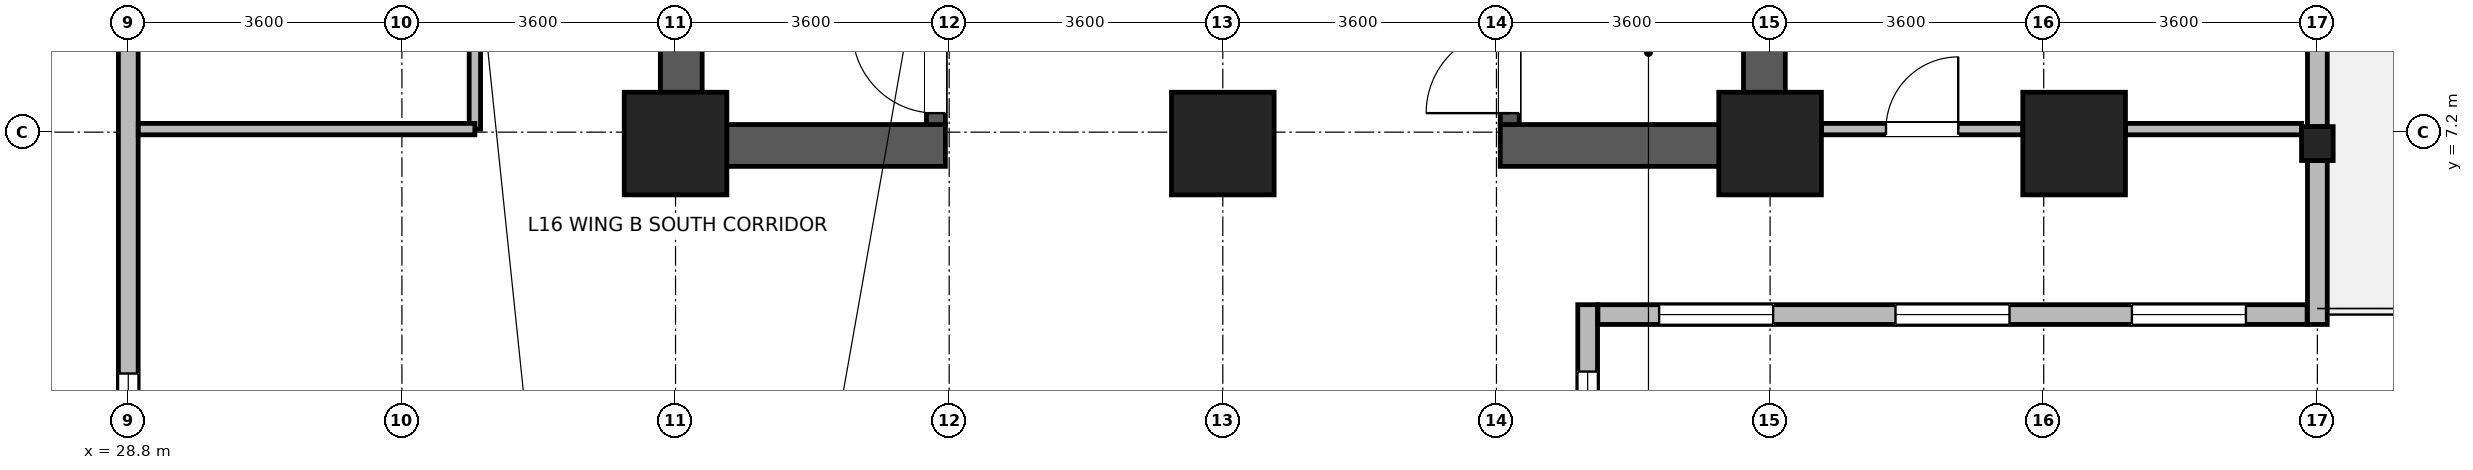
"""IFC4 building model, lengths in metres.
Left out: names, types, materials, properties, quantities, classifications, styles, units other than length and angle.
Written with IfcOpenShell. Run it as: python <this file> out.ifc"""

import sys

from ifc_helpers import new_model, si_unit, direction, frame, frame_2d, origin, origin_2d, place, context, subcontext, project, spatial, rectangle, i_section, extrude, source, transform, mapped, element, fill, save


model = new_model("IFC4")
c1 = context("Model", 3, precision=1e-05, world=origin(), true_north=direction((0.0, 1.0)))
c2 = subcontext(c1, "Body", "Model", "MODEL_VIEW")
j1 = project(units=[si_unit("LENGTHUNIT", "METRE"), si_unit("PLANEANGLEUNIT", "RADIAN")], contexts=[c1])
p1 = place(None, origin())
s1 = spatial("IfcSite", under=j1, at=p1, CompositionType="ELEMENT")
p2 = place(p1, origin())
s2 = spatial("IfcBuilding", under=s1, at=p2, CompositionType="ELEMENT")
p3 = place(p2, frame((0.0, 0.0, 66.0)))
s3 = spatial("IfcBuildingStorey", under=s2, at=p3, CompositionType="ELEMENT", Elevation=66.0)
for number, where, z_axis, x_axis in (
    (1, (36.075, 6.75, 0.0), (0.0, 0.0, 1.0), (0.0, 1.0, 0.0)),
    (2, (50.325, 6.75, 0.0), (0.0, 0.0, 1.0), (0.0, 1.0, 0.0)),
):
    element("IfcWall", number, at=place(p3, frame(where, z_axis=z_axis, x_axis=x_axis)), inside=s3, PredefinedType="SHEAR", context=c2, shape_type="SweptSolid", body=[
        extrude(rectangle(XDim=8.1, YDim=0.55, at=frame_2d((4.05, 0.0))), origin(), (0.0, 0.0, 1.0), 3.45),
    ])
for number, where, z_axis, x_axis in (
    (3, (36.35, 7.025, 0.0), (0.0, 0.0, 1.0), (1.0, 0.0, 0.0)),
    (4, (46.85, 7.025, 0.0), (0.0, 0.0, 1.0), (1.0, 0.0, 0.0)),
):
    element("IfcWall", number, at=place(p3, frame(where, z_axis=z_axis, x_axis=x_axis)), inside=s3, PredefinedType="SHEAR", context=c2, shape_type="SweptSolid", body=[
        extrude(rectangle(XDim=3.2, YDim=0.55, at=frame_2d((1.6, 0.0))), origin(), (0.0, 0.0, 1.0), 3.45),
    ])
p4 = place(p3, frame((39.425, 7.3, 0.0), z_axis=(0.0, 0.0, 1.0), x_axis=(0.0, 1.0, 0.0)))
e5 = element("IfcWall", 5, at=p4, inside=s3, PredefinedType="SHEAR", context=c2, shape_type="SweptSolid", body=[
    extrude(rectangle(XDim=7.0, YDim=0.25, at=frame_2d((3.5, 0.0))), origin(), (0.0, 0.0, 1.0), 3.45),
])
p5 = place(p4, frame((0.15, 0.0, 0.0)))
e6 = element("IfcOpeningElement", 6, at=p5, cuts=e5, PredefinedType="OPENING", context=c2, shape_type="SweptSolid", body=[
    extrude(rectangle(XDim=1.1, YDim=2.08, at=frame_2d((0.55, 1.04))), frame((0.0, 0.135, 0.0), z_axis=(0.0, -1.0, 0.0), x_axis=(1.0, 0.0, 0.0)), (0.0, 0.0, 1.0), 0.27),
])
p6 = place(p3, frame((46.975, 7.3, 0.0), z_axis=(0.0, 0.0, 1.0), x_axis=(0.0, 1.0, 0.0)))
e7 = element("IfcWall", 7, at=p6, inside=s3, PredefinedType="SHEAR", context=c2, shape_type="SweptSolid", body=[
    extrude(rectangle(XDim=7.0, YDim=0.25, at=frame_2d((3.5, 0.0))), origin(), (0.0, 0.0, 1.0), 3.45),
])
p7 = place(p6, frame((0.15, 0.0, 0.0)))
e8 = element("IfcOpeningElement", 8, at=p7, cuts=e7, PredefinedType="OPENING", context=c2, shape_type="SweptSolid", body=[
    extrude(rectangle(XDim=1.1, YDim=2.08, at=frame_2d((0.55, 1.04))), frame((0.0, 0.135, 0.0), z_axis=(0.0, -1.0, 0.0), x_axis=(1.0, 0.0, 0.0)), (0.0, 0.0, 1.0), 0.27),
])
m1 = source(origin(), c2, "Body", "SweptSolid", [
    extrude(rectangle(XDim=1.35, YDim=1.35, at=origin_2d()), origin(), (0.0, 0.0, 1.0), 3.7),
])
for number, where, z_axis, x_axis in (
    (9, (36.0, 7.05, 0.0), (0.0, 0.0, 1.0), (1.0, 0.0, 0.0)),
    (10, (43.2, 7.05, 0.0), (0.0, 0.0, 1.0), (1.0, 0.0, 0.0)),
    (11, (50.4, 7.05, 0.0), (0.0, 0.0, 1.0), (1.0, 0.0, 0.0)),
    (12, (54.4, 7.05, 0.0), (0.0, 0.0, 1.0), (1.0, 0.0, 0.0)),
):
    element("IfcColumn", number, at=place(p3, frame(where, z_axis=z_axis, x_axis=x_axis)), inside=s3, PredefinedType="COLUMN", context=c2, shape_type="MappedRepresentation", body=[
        mapped(m1, transform((0.0, 0.0, 0.0), x_axis=(1.0, 0.0, 0.0), y_axis=(0.0, 1.0, 0.0), z_axis=(0.0, 0.0, 1.0), scale=1.0)),
    ])
m2 = source(origin(), c2, "Body", "SweptSolid", [
    extrude(i_section(OverallWidth=0.416, OverallDepth=0.446, WebThickness=0.029, FlangeThickness=0.04, FilletRadius=0.015, at=origin_2d()), origin(), (0.0, 0.0, 1.0), 3.7),
])
p8 = place(p3, frame((57.6, 7.05, 0.0), z_axis=(0.0, 0.0, 1.0), x_axis=(1.0, 0.0, 0.0)))
e13 = element("IfcColumn", 13, at=p8, inside=s3, PredefinedType="COLUMN", context=c2, shape_type="MappedRepresentation", body=[
    mapped(m2, transform((0.0, 0.0, 0.0), x_axis=(1.0, 0.0, 0.0), y_axis=(0.0, 1.0, 0.0), z_axis=(0.0, 0.0, 1.0), scale=1.0)),
])
p9 = place(p3, frame((48.0, 4.93, 0.0), z_axis=(0.0, 0.0, 1.0), x_axis=(0.0, -1.0, 0.0)))
e14 = element("IfcWall", 14, at=p9, inside=s3, PredefinedType="STANDARD", context=c2, shape_type="SweptSolid", body=[
    extrude(rectangle(XDim=3.26, YDim=0.26, at=frame_2d((1.63, 0.0))), origin(), (0.0, 0.0, 1.0), 3.43),
])
p10 = place(p9, frame((0.88, 0.0, 0.85)))
e15 = element("IfcOpeningElement", 15, at=p10, cuts=e14, PredefinedType="OPENING", context=c2, shape_type="SweptSolid", body=[
    extrude(rectangle(XDim=1.5, YDim=1.85, at=frame_2d((0.75, 0.925))), frame((0.0, 0.14, 0.0), z_axis=(0.0, -1.0, 0.0), x_axis=(1.0, 0.0, 0.0)), (0.0, 0.0, 1.0), 0.28),
])
p11 = place(p3, frame((57.465, 4.8, 0.0), z_axis=(0.0, 0.0, 1.0), x_axis=(-1.0, 0.0, 0.0)))
e16 = element("IfcWall", 16, at=p11, inside=s3, PredefinedType="STANDARD", context=c2, shape_type="SweptSolid", body=[
    extrude(rectangle(XDim=9.33, YDim=0.26, at=frame_2d((4.665, 0.0))), origin(), (0.0, 0.0, 1.0), 3.43),
])
p12 = place(p11, frame((0.805, 0.0, 0.85)))
e17 = element("IfcOpeningElement", 17, at=p12, cuts=e16, PredefinedType="OPENING", context=c2, shape_type="SweptSolid", body=[
    extrude(rectangle(XDim=1.5, YDim=1.85, at=frame_2d((0.75, 0.925))), frame((0.0, 0.14, 0.0), z_axis=(0.0, -1.0, 0.0), x_axis=(1.0, 0.0, 0.0)), (0.0, 0.0, 1.0), 0.28),
])
p13 = place(p11, frame((3.915, 0.0, 0.85)))
e18 = element("IfcOpeningElement", 18, at=p13, cuts=e16, PredefinedType="OPENING", context=c2, shape_type="SweptSolid", body=[
    extrude(rectangle(XDim=1.5, YDim=1.85, at=frame_2d((0.75, 0.925))), frame((0.0, 0.14, 0.0), z_axis=(0.0, -1.0, 0.0), x_axis=(1.0, 0.0, 0.0)), (0.0, 0.0, 1.0), 0.28),
])
p14 = place(p11, frame((7.025, 0.0, 0.85)))
e19 = element("IfcOpeningElement", 19, at=p14, cuts=e16, PredefinedType="OPENING", context=c2, shape_type="SweptSolid", body=[
    extrude(rectangle(XDim=1.5, YDim=1.85, at=frame_2d((0.75, 0.925))), frame((0.0, 0.14, 0.0), z_axis=(0.0, -1.0, 0.0), x_axis=(1.0, 0.0, 0.0)), (0.0, 0.0, 1.0), 0.28),
])
p15 = place(p3, frame((57.6, 6.826, 0.0), z_axis=(0.0, 0.0, 1.0), x_axis=(0.0, -1.0, 0.0)))
e20 = element("IfcWall", 20, at=p15, inside=s3, PredefinedType="STANDARD", context=c2, shape_type="SweptSolid", body=[
    extrude(rectangle(XDim=2.156, YDim=0.26, at=frame_2d((1.078, 0.0))), origin(), (0.0, 0.0, 1.0), 3.43),
])
p16 = place(p3, frame((57.6, 14.326, 0.0), z_axis=(0.0, 0.0, 1.0), x_axis=(0.0, -1.0, 0.0)))
e21 = element("IfcWall", 21, at=p16, inside=s3, PredefinedType="STANDARD", context=c2, shape_type="SweptSolid", body=[
    extrude(rectangle(XDim=7.052, YDim=0.26, at=frame_2d((3.526, 0.0))), origin(), (0.0, 0.0, 1.0), 2.93),
])
p17 = place(p16, frame((2.776, 0.0, 0.0)))
e22 = element("IfcOpeningElement", 22, at=p17, cuts=e21, PredefinedType="OPENING", context=c2, shape_type="SweptSolid", body=[
    extrude(rectangle(XDim=1.5, YDim=2.15, at=frame_2d((0.75, 1.075))), frame((0.0, 0.14, 0.0), z_axis=(0.0, -1.0, 0.0), x_axis=(1.0, 0.0, 0.0)), (0.0, 0.0, 1.0), 0.28),
])
p18 = place(p16, frame((1.013, 0.0, 0.85)))
e23 = element("IfcOpeningElement", 23, at=p18, cuts=e21, PredefinedType="OPENING", context=c2, shape_type="SweptSolid", body=[
    extrude(rectangle(XDim=1.5, YDim=1.85, at=frame_2d((0.75, 0.925))), frame((0.0, 0.14, 0.0), z_axis=(0.0, -1.0, 0.0), x_axis=(1.0, 0.0, 0.0)), (0.0, 0.0, 1.0), 0.28),
])
p19 = place(p16, frame((4.539, 0.0, 0.85)))
e24 = element("IfcOpeningElement", 24, at=p19, cuts=e21, PredefinedType="OPENING", context=c2, shape_type="SweptSolid", body=[
    extrude(rectangle(XDim=1.5, YDim=1.85, at=frame_2d((0.75, 0.925))), frame((0.0, 0.14, 0.0), z_axis=(0.0, -1.0, 0.0), x_axis=(1.0, 0.0, 0.0)), (0.0, 0.0, 1.0), 0.28),
])
p20 = place(p3, frame((28.8, 1.67, 0.0), z_axis=(0.0, 0.0, 1.0), x_axis=(0.0, 1.0, 0.0)))
e25 = element("IfcWall", 25, at=p20, inside=s3, PredefinedType="STANDARD", context=c2, shape_type="SweptSolid", body=[
    extrude(rectangle(XDim=19.254, YDim=0.26, at=frame_2d((9.627, 0.0))), origin(), (0.0, 0.0, 1.0), 3.43),
])
p21 = place(p20, frame((0.854, 0.0, 0.85)))
e26 = element("IfcOpeningElement", 26, at=p21, cuts=e25, PredefinedType="OPENING", context=c2, shape_type="SweptSolid", body=[
    extrude(rectangle(XDim=1.5, YDim=1.85, at=frame_2d((0.75, 0.925))), frame((0.0, 0.14, 0.0), z_axis=(0.0, -1.0, 0.0), x_axis=(1.0, 0.0, 0.0)), (0.0, 0.0, 1.0), 0.28),
])
p22 = place(p20, frame((7.272, 0.0, 0.85)))
e27 = element("IfcOpeningElement", 27, at=p22, cuts=e25, PredefinedType="OPENING", context=c2, shape_type="SweptSolid", body=[
    extrude(rectangle(XDim=1.5, YDim=1.85, at=frame_2d((0.75, 0.925))), frame((0.0, 0.14, 0.0), z_axis=(0.0, -1.0, 0.0), x_axis=(1.0, 0.0, 0.0)), (0.0, 0.0, 1.0), 0.28),
])
p23 = place(p20, frame((10.481, 0.0, 0.85)))
e28 = element("IfcOpeningElement", 28, at=p23, cuts=e25, PredefinedType="OPENING", context=c2, shape_type="SweptSolid", body=[
    extrude(rectangle(XDim=1.5, YDim=1.85, at=frame_2d((0.75, 0.925))), frame((0.0, 0.14, 0.0), z_axis=(0.0, -1.0, 0.0), x_axis=(1.0, 0.0, 0.0)), (0.0, 0.0, 1.0), 0.28),
])
p24 = place(p20, frame((13.69, 0.0, 0.85)))
e29 = element("IfcOpeningElement", 29, at=p24, cuts=e25, PredefinedType="OPENING", context=c2, shape_type="SweptSolid", body=[
    extrude(rectangle(XDim=1.5, YDim=1.85, at=frame_2d((0.75, 0.925))), frame((0.0, 0.14, 0.0), z_axis=(0.0, -1.0, 0.0), x_axis=(1.0, 0.0, 0.0)), (0.0, 0.0, 1.0), 0.28),
])
p25 = place(p20, frame((16.899, 0.0, 0.85)))
e30 = element("IfcOpeningElement", 30, at=p25, cuts=e25, PredefinedType="OPENING", context=c2, shape_type="SweptSolid", body=[
    extrude(rectangle(XDim=1.5, YDim=1.85, at=frame_2d((0.75, 0.925))), frame((0.0, 0.14, 0.0), z_axis=(0.0, -1.0, 0.0), x_axis=(1.0, 0.0, 0.0)), (0.0, 0.0, 1.0), 0.28),
])
p26 = place(p3, frame((33.36, 7.24, 0.0), z_axis=(0.0, 0.0, 1.0), x_axis=(0.0, 1.0, 0.0)))
e31 = element("IfcWall", 31, at=p26, inside=s3, PredefinedType="PARTITIONING", context=c2, shape_type="SweptSolid", body=[
    extrude(rectangle(XDim=7.26, YDim=0.15, at=frame_2d((3.63, 0.0))), origin(), (0.0, 0.0, 1.0), 3.43),
])
p27 = place(p26, frame((2.98, 0.0, 0.0)))
e32 = element("IfcOpeningElement", 32, at=p27, cuts=e31, PredefinedType="OPENING", context=c2, shape_type="SweptSolid", body=[
    extrude(rectangle(XDim=1.3, YDim=2.12, at=frame_2d((0.65, 1.06))), frame((0.0, 0.085, 0.0), z_axis=(0.0, -1.0, 0.0), x_axis=(1.0, 0.0, 0.0)), (0.0, 0.0, 1.0), 0.17),
])
p28 = place(p3, frame((51.075, 7.24, 0.0), z_axis=(0.0, 0.0, 1.0), x_axis=(1.0, 0.0, 0.0)))
e33 = element("IfcWall", 33, at=p28, inside=s3, PredefinedType="PARTITIONING", context=c2, shape_type="SweptSolid", body=[
    extrude(rectangle(XDim=2.65, YDim=0.15, at=frame_2d((1.325, 0.0))), origin(), (0.0, 0.0, 1.0), 2.78),
])
p29 = place(p28, frame((0.85, 0.0, 0.0)))
e34 = element("IfcOpeningElement", 34, at=p29, cuts=e33, PredefinedType="OPENING", context=c2, shape_type="SweptSolid", body=[
    extrude(rectangle(XDim=0.95, YDim=2.1, at=frame_2d((0.475, 1.05))), frame((0.0, 0.085, 0.0), z_axis=(0.0, -1.0, 0.0), x_axis=(1.0, 0.0, 0.0)), (0.0, 0.0, 1.0), 0.17),
])
p30 = place(p3, frame((55.075, 7.24, 0.0), z_axis=(0.0, 0.0, 1.0), x_axis=(1.0, 0.0, 0.0)))
e35 = element("IfcWall", 35, at=p30, inside=s3, PredefinedType="PARTITIONING", context=c2, shape_type="SweptSolid", body=[
    extrude(rectangle(XDim=2.317, YDim=0.15, at=frame_2d((1.159, 0.0))), origin(), (0.0, 0.0, 1.0), 2.78),
])
p31 = place(p3, frame((28.932, 7.24, 0.0), z_axis=(0.0, 0.0, 1.0), x_axis=(1.0, 0.0, 0.0)))
e36 = element("IfcWall", 36, at=p31, inside=s3, PredefinedType="PARTITIONING", context=c2, shape_type="SweptSolid", body=[
    extrude(rectangle(XDim=4.428, YDim=0.15, at=frame_2d((2.214, 0.0))), origin(), (0.0, 0.0, 1.0), 3.43),
])
p32 = place(p10, origin())
e37 = element("IfcWindow", 37, at=p32, inside=s3, PartitioningType="SINGLE_PANEL", PredefinedType="WINDOW", context=c2, shape_type="SweptSolid", body=[
    extrude(rectangle(XDim=1.5, YDim=1.85, at=frame_2d((0.75, 0.925))), frame((0.0, 0.03, 0.0), z_axis=(0.0, -1.0, 0.0), x_axis=(1.0, 0.0, 0.0)), (0.0, 0.0, 1.0), 0.06),
])
fill(e15, e37)
p33 = place(p12, origin())
e38 = element("IfcWindow", 38, at=p33, inside=s3, PartitioningType="SINGLE_PANEL", PredefinedType="WINDOW", context=c2, shape_type="SweptSolid", body=[
    extrude(rectangle(XDim=1.5, YDim=1.85, at=frame_2d((0.75, 0.925))), frame((0.0, 0.03, 0.0), z_axis=(0.0, -1.0, 0.0), x_axis=(1.0, 0.0, 0.0)), (0.0, 0.0, 1.0), 0.06),
])
fill(e17, e38)
p34 = place(p13, origin())
e39 = element("IfcWindow", 39, at=p34, inside=s3, PartitioningType="SINGLE_PANEL", PredefinedType="WINDOW", context=c2, shape_type="SweptSolid", body=[
    extrude(rectangle(XDim=1.5, YDim=1.85, at=frame_2d((0.75, 0.925))), frame((0.0, 0.03, 0.0), z_axis=(0.0, -1.0, 0.0), x_axis=(1.0, 0.0, 0.0)), (0.0, 0.0, 1.0), 0.06),
])
fill(e18, e39)
p35 = place(p14, origin())
e40 = element("IfcWindow", 40, at=p35, inside=s3, PartitioningType="SINGLE_PANEL", PredefinedType="WINDOW", context=c2, shape_type="SweptSolid", body=[
    extrude(rectangle(XDim=1.5, YDim=1.85, at=frame_2d((0.75, 0.925))), frame((0.0, 0.03, 0.0), z_axis=(0.0, -1.0, 0.0), x_axis=(1.0, 0.0, 0.0)), (0.0, 0.0, 1.0), 0.06),
])
fill(e19, e40)
p36 = place(p21, origin())
e41 = element("IfcWindow", 41, at=p36, inside=s3, PartitioningType="SINGLE_PANEL", PredefinedType="WINDOW", context=c2, shape_type="SweptSolid", body=[
    extrude(rectangle(XDim=1.5, YDim=1.85, at=frame_2d((0.75, 0.925))), frame((0.0, 0.03, 0.0), z_axis=(0.0, -1.0, 0.0), x_axis=(1.0, 0.0, 0.0)), (0.0, 0.0, 1.0), 0.06),
])
fill(e26, e41)
p37 = place(p5, origin())
e42 = element("IfcDoor", 42, at=p37, inside=s3, OperationType="SINGLE_SWING_RIGHT", PredefinedType="DOOR", context=c2, shape_type="SweptSolid", body=[
    extrude(rectangle(XDim=1.1, YDim=2.08, at=frame_2d((0.55, 1.04))), frame((0.0, 0.025, 0.0), z_axis=(0.0, -1.0, 0.0), x_axis=(1.0, 0.0, 0.0)), (0.0, 0.0, 1.0), 0.05),
])
fill(e6, e42)
p38 = place(p7, origin())
e43 = element("IfcDoor", 43, at=p38, inside=s3, OperationType="SINGLE_SWING_LEFT", PredefinedType="DOOR", context=c2, shape_type="SweptSolid", body=[
    extrude(rectangle(XDim=1.1, YDim=2.08, at=frame_2d((0.55, 1.04))), frame((0.0, 0.025, 0.0), z_axis=(0.0, -1.0, 0.0), x_axis=(1.0, 0.0, 0.0)), (0.0, 0.0, 1.0), 0.05),
])
fill(e8, e43)
p39 = place(p29, origin())
e44 = element("IfcDoor", 44, at=p39, inside=s3, OperationType="SINGLE_SWING_RIGHT", PredefinedType="DOOR", context=c2, shape_type="SweptSolid", body=[
    extrude(rectangle(XDim=0.95, YDim=2.1, at=frame_2d((0.475, 1.05))), frame((0.0, 0.025, 0.0), z_axis=(0.0, -1.0, 0.0), x_axis=(1.0, 0.0, 0.0)), (0.0, 0.0, 1.0), 0.05),
])
fill(e34, e44)
save(model, sys.argv[1])
